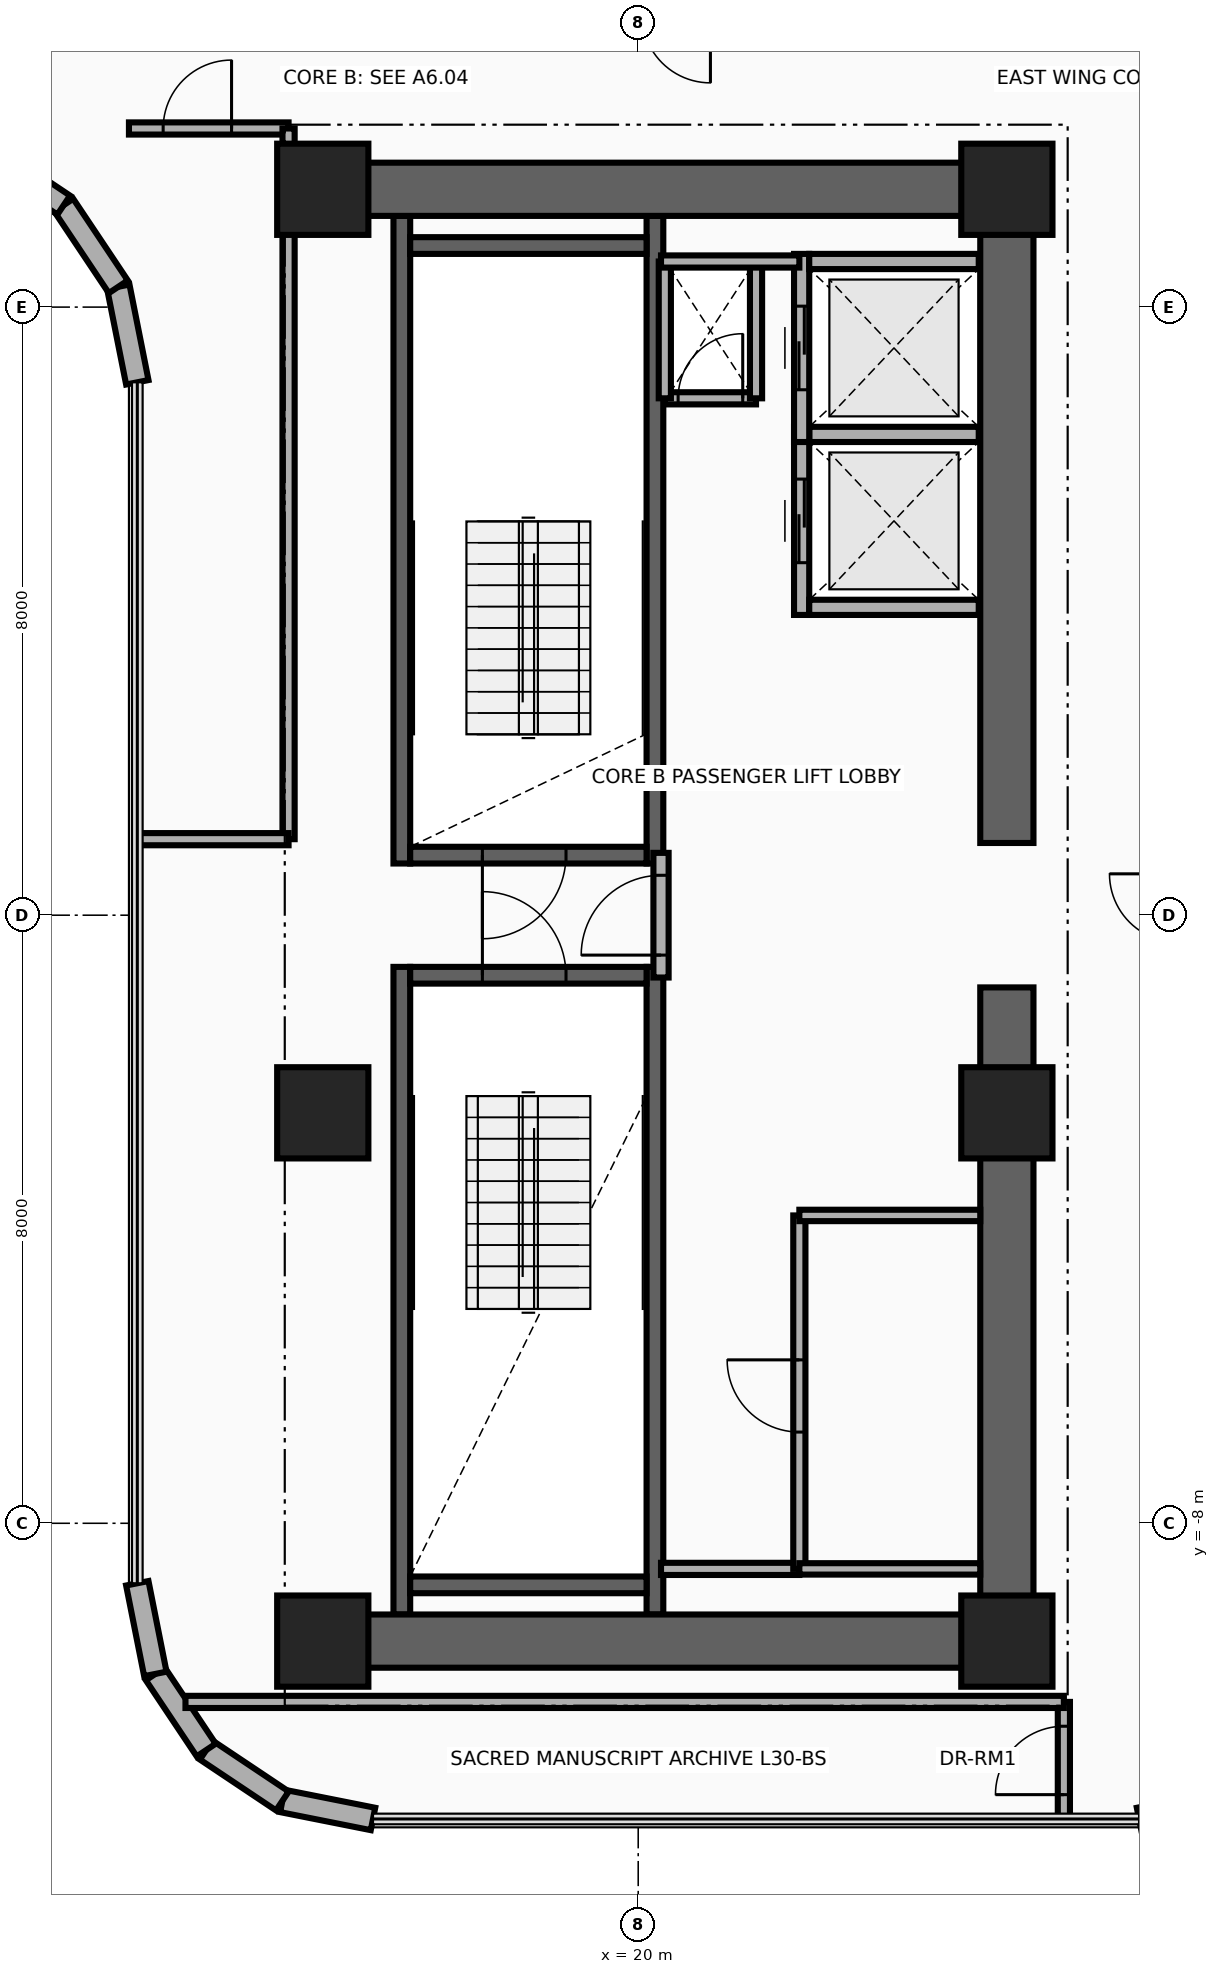
"""IFC4 building model, lengths in metres.
Left out: names, types, materials, properties, quantities, classifications, styles, units other than length and angle.
Written with IfcOpenShell. Run it as: python <this file> out.ifc"""

import sys

from ifc_helpers import new_model, si_unit, direction, frame, frame_2d, origin, origin_2d, place, context, subcontext, project, spatial, rectangle, extrude, source, transform, mapped, element, fill, save


model = new_model("IFC4")
c1 = context("Model", 3, precision=1e-05, world=origin(), true_north=direction((0.0, 1.0)))
c2 = subcontext(c1, "Body", "Model", "MODEL_VIEW")
j1 = project(units=[si_unit("LENGTHUNIT", "METRE"), si_unit("PLANEANGLEUNIT", "RADIAN")], contexts=[c1])
p1 = place(None, origin())
s1 = spatial("IfcSite", under=j1, at=p1, CompositionType="ELEMENT")
p2 = place(p1, origin())
s2 = spatial("IfcBuilding", under=s1, at=p2, CompositionType="ELEMENT")
p3 = place(p2, frame((0.0, 0.0, 120.5)))
s3 = spatial("IfcBuildingStorey", under=s2, at=p3, CompositionType="ELEMENT", Elevation=120.5)
for number, where, z_axis, x_axis in (
    (1, (16.89, 0.68, 0.0), (0.0, 0.0, 1.0), (0.0, 1.0, 0.0)),
    (2, (20.22, 0.68, 0.0), (0.0, 0.0, 1.0), (0.0, 1.0, 0.0)),
):
    element("IfcWall", number, at=place(p3, frame(where, z_axis=z_axis, x_axis=x_axis)), inside=s3, PredefinedType="SHEAR", context=c2, shape_type="SweptSolid", body=[
        extrude(rectangle(XDim=8.52, YDim=0.22, at=frame_2d((4.26, 0.0))), origin(), (0.0, 0.0, 1.0), 3.46),
    ])
p4 = place(p3, frame((17.0, 0.79, 0.0), z_axis=(0.0, 0.0, 1.0), x_axis=(1.0, 0.0, 0.0)))
e3 = element("IfcWall", 3, at=p4, inside=s3, PredefinedType="SHEAR", context=c2, shape_type="SweptSolid", body=[
    extrude(rectangle(XDim=3.11, YDim=0.22, at=frame_2d((1.555, 0.0))), origin(), (0.0, 0.0, 1.0), 3.46),
])
p5 = place(p4, frame((0.95, 0.0, 0.0)))
e4 = element("IfcOpeningElement", 4, at=p5, cuts=e3, PredefinedType="OPENING", context=c2, shape_type="SweptSolid", body=[
    extrude(rectangle(XDim=1.1, YDim=2.15, at=frame_2d((0.55, 1.075))), frame((0.0, 0.125, 0.0), z_axis=(0.0, -1.0, 0.0), x_axis=(1.0, 0.0, 0.0)), (0.0, 0.0, 1.0), 0.25),
])
p6 = place(p3, frame((17.0, 8.81, 0.0), z_axis=(0.0, 0.0, 1.0), x_axis=(1.0, 0.0, 0.0)))
e5 = element("IfcWall", 5, at=p6, inside=s3, PredefinedType="SHEAR", context=c2, shape_type="SweptSolid", body=[
    extrude(rectangle(XDim=3.11, YDim=0.22, at=frame_2d((1.555, 0.0))), origin(), (0.0, 0.0, 1.0), 3.46),
])
for number, where, z_axis, x_axis in (
    (6, (16.89, -9.2, 0.0), (0.0, 0.0, 1.0), (0.0, 1.0, 0.0)),
    (7, (20.22, -9.2, 0.0), (0.0, 0.0, 1.0), (0.0, 1.0, 0.0)),
):
    element("IfcWall", number, at=place(p3, frame(where, z_axis=z_axis, x_axis=x_axis)), inside=s3, PredefinedType="SHEAR", context=c2, shape_type="SweptSolid", body=[
        extrude(rectangle(XDim=8.52, YDim=0.22, at=frame_2d((4.26, 0.0))), origin(), (0.0, 0.0, 1.0), 3.46),
    ])
p7 = place(p3, frame((17.0, -8.81, 0.0), z_axis=(0.0, 0.0, 1.0), x_axis=(1.0, 0.0, 0.0)))
e8 = element("IfcWall", 8, at=p7, inside=s3, PredefinedType="SHEAR", context=c2, shape_type="SweptSolid", body=[
    extrude(rectangle(XDim=3.11, YDim=0.22, at=frame_2d((1.555, 0.0))), origin(), (0.0, 0.0, 1.0), 3.46),
])
p8 = place(p3, frame((17.0, -0.79, 0.0), z_axis=(0.0, 0.0, 1.0), x_axis=(1.0, 0.0, 0.0)))
e9 = element("IfcWall", 9, at=p8, inside=s3, PredefinedType="SHEAR", context=c2, shape_type="SweptSolid", body=[
    extrude(rectangle(XDim=3.11, YDim=0.22, at=frame_2d((1.555, 0.0))), origin(), (0.0, 0.0, 1.0), 3.46),
])
p9 = place(p8, frame((0.95, 0.0, 0.0)))
e10 = element("IfcOpeningElement", 10, at=p9, cuts=e9, PredefinedType="OPENING", context=c2, shape_type="SweptSolid", body=[
    extrude(rectangle(XDim=1.1, YDim=2.15, at=frame_2d((0.55, 1.075))), frame((0.0, 0.125, 0.0), z_axis=(0.0, -1.0, 0.0), x_axis=(1.0, 0.0, 0.0)), (0.0, 0.0, 1.0), 0.25),
])
for number, where, z_axis, x_axis in (
    (11, (24.85, -9.9, 0.0), (0.0, 0.0, 1.0), (0.0, 1.0, 0.0)),
    (12, (24.85, 0.95, 0.0), (0.0, 0.0, 1.0), (0.0, 1.0, 0.0)),
):
    element("IfcWall", number, at=place(p3, frame(where, z_axis=z_axis, x_axis=x_axis)), inside=s3, PredefinedType="SHEAR", context=c2, shape_type="SweptSolid", body=[
        extrude(rectangle(XDim=8.95, YDim=0.7, at=frame_2d((4.475, 0.0))), origin(), (0.0, 0.0, 1.0), 3.46),
    ])
for number, where, z_axis, x_axis in (
    (13, (15.85, 9.55, 0.0), (0.0, 0.0, 1.0), (1.0, 0.0, 0.0)),
    (14, (15.85, -9.55, 0.0), (0.0, 0.0, 1.0), (1.0, 0.0, 0.0)),
):
    element("IfcWall", number, at=place(p3, frame(where, z_axis=z_axis, x_axis=x_axis)), inside=s3, PredefinedType="SHEAR", context=c2, shape_type="SweptSolid", body=[
        extrude(rectangle(XDim=9.0, YDim=0.7, at=frame_2d((4.5, 0.0))), origin(), (0.0, 0.0, 1.0), 3.46),
    ])
m1 = source(origin(), c2, "Body", "SweptSolid", [
    extrude(rectangle(XDim=1.2, YDim=1.2, at=origin_2d()), origin(), (0.0, 0.0, 1.0), 3.7),
])
for number, where, z_axis, x_axis in (
    (15, (15.85, -9.55, 0.0), (0.0, 0.0, 1.0), (1.0, 0.0, 0.0)),
    (16, (24.85, -9.55, 0.0), (0.0, 0.0, 1.0), (1.0, 0.0, 0.0)),
    (17, (15.85, -2.6, 0.0), (0.0, 0.0, 1.0), (1.0, 0.0, 0.0)),
    (18, (24.85, -2.6, 0.0), (0.0, 0.0, 1.0), (1.0, 0.0, 0.0)),
    (19, (15.85, 9.55, 0.0), (0.0, 0.0, 1.0), (1.0, 0.0, 0.0)),
    (20, (24.85, 9.55, 0.0), (0.0, 0.0, 1.0), (1.0, 0.0, 0.0)),
):
    element("IfcColumn", number, at=place(p3, frame(where, z_axis=z_axis, x_axis=x_axis)), inside=s3, PredefinedType="COLUMN", context=c2, shape_type="MappedRepresentation", body=[
        mapped(m1, transform((0.0, 0.0, 0.0), x_axis=(1.0, 0.0, 0.0), y_axis=(0.0, 1.0, 0.0), z_axis=(0.0, 0.0, 1.0), scale=1.0)),
    ])
p10 = place(p3, frame((27.782, -11.653, 0.0), z_axis=(0.0, 0.0, 1.0), x_axis=(-0.980811661072, -0.194957650543, 0.0)))
e21 = element("IfcWall", 21, at=p10, inside=s3, PredefinedType="SOLIDWALL", context=c2, shape_type="SweptSolid", body=[
    extrude(rectangle(XDim=1.216, YDim=0.3, at=frame_2d((0.608, 0.0))), origin(), (0.0, 0.0, 1.0), 3.46),
])
p11 = place(p3, frame((16.511, -11.89, 0.0), z_axis=(0.0, 0.0, 1.0), x_axis=(-0.980804027463, 0.194996050505, 0.0)))
e22 = element("IfcWall", 22, at=p11, inside=s3, PredefinedType="SOLIDWALL", context=c2, shape_type="SweptSolid", body=[
    extrude(rectangle(XDim=1.216, YDim=0.3, at=frame_2d((0.608, 0.0))), origin(), (0.0, 0.0, 1.0), 3.46),
])
for number, where, z_axis, x_axis in (
    (23, (15.318, -11.653, 0.0), (0.0, 0.0, 1.0), (-0.831, 0.556, 0.0)),
    (24, (14.317, -10.983, 0.0), (0.0, 0.0, 1.0), (-0.556, 0.831, 0.0)),
):
    element("IfcWall", number, at=place(p3, frame(where, z_axis=z_axis, x_axis=x_axis)), inside=s3, PredefinedType="SOLIDWALL", context=c2, shape_type="SweptSolid", body=[
        extrude(rectangle(XDim=1.205, YDim=0.3, at=frame_2d((0.603, 0.0))), origin(), (0.0, 0.0, 1.0), 3.46),
    ])
p12 = place(p3, frame((13.647, -9.982, 0.0), z_axis=(0.0, 0.0, 1.0), x_axis=(-0.195189223115, 0.980765602568, 0.0)))
e25 = element("IfcWall", 25, at=p12, inside=s3, PredefinedType="SOLIDWALL", context=c2, shape_type="SweptSolid", body=[
    extrude(rectangle(XDim=1.216, YDim=0.3, at=frame_2d((0.608, 0.0))), origin(), (0.0, 0.0, 1.0), 3.46),
])
p13 = place(p3, frame((13.41, 7.011, 0.0), z_axis=(0.0, 0.0, 1.0), x_axis=(-0.195090163074, 0.980785312019, 0.0)))
e26 = element("IfcWall", 26, at=p13, inside=s3, PredefinedType="SOLIDWALL", context=c2, shape_type="SweptSolid", body=[
    extrude(rectangle(XDim=1.281, YDim=0.3, at=frame_2d((0.641, 0.0))), origin(), (0.0, 0.0, 1.0), 3.46),
])
for number, where, z_axis, x_axis in (
    (27, (13.16, 8.268, 0.0), (0.0, 0.0, 1.0), (-0.556, 0.831, 0.0)),
    (28, (12.442, 9.342, 0.0), (0.0, 0.0, 1.0), (-0.831, 0.556, 0.0)),
):
    element("IfcWall", number, at=place(p3, frame(where, z_axis=z_axis, x_axis=x_axis)), inside=s3, PredefinedType="SOLIDWALL", context=c2, shape_type="SweptSolid", body=[
        extrude(rectangle(XDim=1.292, YDim=0.3, at=frame_2d((0.646, 0.0))), origin(), (0.0, 0.0, 1.0), 3.46),
    ])
p14 = place(p3, frame((22.15, 3.95, 0.0), z_axis=(0.0, 0.0, 1.0), x_axis=(0.0, 1.0, 0.0)))
e29 = element("IfcWall", 29, at=p14, inside=s3, PredefinedType="MOVABLE", context=c2, shape_type="SweptSolid", body=[
    extrude(rectangle(XDim=2.475, YDim=0.2, at=frame_2d((1.238, 0.0))), origin(), (0.0, 0.0, 1.0), 3.46),
])
p15 = place(p14, frame((0.688, 0.0, 0.0)))
e30 = element("IfcOpeningElement", 30, at=p15, cuts=e29, PredefinedType="OPENING", context=c2, shape_type="SweptSolid", body=[
    extrude(rectangle(XDim=1.1, YDim=2.1, at=frame_2d((0.55, 1.05))), frame((0.0, 0.115, 0.0), z_axis=(0.0, -1.0, 0.0), x_axis=(1.0, 0.0, 0.0)), (0.0, 0.0, 1.0), 0.23),
])
for number, where, z_axis, x_axis in (
    (31, (22.25, 4.05, 0.0), (0.0, 0.0, 1.0), (1.0, 0.0, 0.0)),
    (32, (22.25, 6.325, 0.0), (0.0, 0.0, 1.0), (1.0, 0.0, 0.0)),
):
    element("IfcWall", number, at=place(p3, frame(where, z_axis=z_axis, x_axis=x_axis)), inside=s3, PredefinedType="MOVABLE", context=c2, shape_type="SweptSolid", body=[
        extrude(rectangle(XDim=2.23, YDim=0.2, at=frame_2d((1.115, 0.0))), origin(), (0.0, 0.0, 1.0), 2.245),
    ])
p16 = place(p3, frame((22.15, 6.225, 0.0), z_axis=(0.0, 0.0, 1.0), x_axis=(0.0, 1.0, 0.0)))
e33 = element("IfcWall", 33, at=p16, inside=s3, PredefinedType="MOVABLE", context=c2, shape_type="SweptSolid", body=[
    extrude(rectangle(XDim=2.475, YDim=0.2, at=frame_2d((1.237, 0.0))), origin(), (0.0, 0.0, 1.0), 3.46),
])
p17 = place(p16, frame((0.688, 0.0, 0.0)))
e34 = element("IfcOpeningElement", 34, at=p17, cuts=e33, PredefinedType="OPENING", context=c2, shape_type="SweptSolid", body=[
    extrude(rectangle(XDim=1.1, YDim=2.1, at=frame_2d((0.55, 1.05))), frame((0.0, 0.115, 0.0), z_axis=(0.0, -1.0, 0.0), x_axis=(1.0, 0.0, 0.0)), (0.0, 0.0, 1.0), 0.23),
])
p18 = place(p3, frame((22.25, 8.6, 0.0), z_axis=(0.0, 0.0, 1.0), x_axis=(1.0, 0.0, 0.0)))
e35 = element("IfcWall", 35, at=p18, inside=s3, PredefinedType="MOVABLE", context=c2, shape_type="SweptSolid", body=[
    extrude(rectangle(XDim=2.23, YDim=0.2, at=frame_2d((1.115, 0.0))), origin(), (0.0, 0.0, 1.0), 2.245),
])
p19 = place(p3, frame((20.3, -0.82, 0.0), z_axis=(0.0, 0.0, 1.0), x_axis=(0.0, 1.0, 0.0)))
e36 = element("IfcWall", 36, at=p19, inside=s3, PredefinedType="PARTITIONING", context=c2, shape_type="SweptSolid", body=[
    extrude(rectangle(XDim=1.64, YDim=0.2, at=frame_2d((0.82, 0.0))), origin(), (0.0, 0.0, 1.0), 3.46),
])
p20 = place(p19, frame((0.295, 0.0, 0.0)))
e37 = element("IfcOpeningElement", 37, at=p20, cuts=e36, PredefinedType="OPENING", context=c2, shape_type="SweptSolid", body=[
    extrude(rectangle(XDim=1.05, YDim=2.15, at=frame_2d((0.525, 1.075))), frame((0.0, 0.115, 0.0), z_axis=(0.0, -1.0, 0.0), x_axis=(1.0, 0.0, 0.0)), (0.0, 0.0, 1.0), 0.23),
])
p21 = place(p3, frame((20.35, 6.8, 0.0), z_axis=(0.0, 0.0, 1.0), x_axis=(1.0, 0.0, 0.0)))
e38 = element("IfcWall", 38, at=p21, inside=s3, PredefinedType="PARTITIONING", context=c2, shape_type="SweptSolid", body=[
    extrude(rectangle(XDim=1.2, YDim=0.16, at=frame_2d((0.6, 0.0))), origin(), (0.0, 0.0, 1.0), 3.46),
])
p22 = place(p21, frame((0.175, 0.0, 0.0)))
e39 = element("IfcOpeningElement", 39, at=p22, cuts=e38, PredefinedType="OPENING", context=c2, shape_type="SweptSolid", body=[
    extrude(rectangle(XDim=0.85, YDim=2.05, at=frame_2d((0.425, 1.025))), frame((0.0, 0.095, 0.0), z_axis=(0.0, -1.0, 0.0), x_axis=(1.0, 0.0, 0.0)), (0.0, 0.0, 1.0), 0.19),
])
for number, where, z_axis, x_axis in (
    (40, (21.55, 6.8, 0.0), (0.0, 0.0, 1.0), (0.0, 1.0, 0.0)),
    (41, (20.35, 6.8, 0.0), (0.0, 0.0, 1.0), (0.0, 1.0, 0.0)),
):
    element("IfcWall", number, at=place(p3, frame(where, z_axis=z_axis, x_axis=x_axis)), inside=s3, PredefinedType="PARTITIONING", context=c2, shape_type="SweptSolid", body=[
        extrude(rectangle(XDim=1.8, YDim=0.16, at=frame_2d((0.9, 0.0))), origin(), (0.0, 0.0, 1.0), 3.46),
    ])
for number, where, z_axis, x_axis in (
    (42, (20.3, -8.6, 0.0), (0.0, 0.0, 1.0), (1.0, 0.0, 0.0)),
    (43, (20.3, 8.6, 0.0), (0.0, 0.0, 1.0), (1.0, 0.0, 0.0)),
):
    element("IfcWall", number, at=place(p3, frame(where, z_axis=z_axis, x_axis=x_axis)), inside=s3, PredefinedType="PARTITIONING", context=c2, shape_type="SweptSolid", body=[
        extrude(rectangle(XDim=1.82, YDim=0.16, at=frame_2d((0.91, 0.0))), origin(), (0.0, 0.0, 1.0), 3.46),
    ])
p23 = place(p3, frame((22.12, -8.6, 0.0), z_axis=(0.0, 0.0, 1.0), x_axis=(0.0, 1.0, 0.0)))
e44 = element("IfcWall", 44, at=p23, inside=s3, PredefinedType="PARTITIONING", context=c2, shape_type="SweptSolid", body=[
    extrude(rectangle(XDim=4.65, YDim=0.16, at=frame_2d((2.325, 0.0))), origin(), (0.0, 0.0, 1.0), 3.46),
])
p24 = place(p23, frame((1.8, 0.0, 0.0)))
e45 = element("IfcOpeningElement", 45, at=p24, cuts=e44, PredefinedType="OPENING", context=c2, shape_type="SweptSolid", body=[
    extrude(rectangle(XDim=0.95, YDim=2.15, at=frame_2d((0.475, 1.075))), frame((0.0, 0.095, 0.0), z_axis=(0.0, -1.0, 0.0), x_axis=(1.0, 0.0, 0.0)), (0.0, 0.0, 1.0), 0.19),
])
for number, where, z_axis, x_axis in (
    (46, (22.12, -3.95, 0.0), (0.0, 0.0, 1.0), (1.0, 0.0, 0.0)),
    (47, (22.12, -8.6, 0.0), (0.0, 0.0, 1.0), (1.0, 0.0, 0.0)),
):
    element("IfcWall", number, at=place(p3, frame(where, z_axis=z_axis, x_axis=x_axis)), inside=s3, PredefinedType="PARTITIONING", context=c2, shape_type="SweptSolid", body=[
        extrude(rectangle(XDim=2.38, YDim=0.15, at=frame_2d((1.19, 0.0))), origin(), (0.0, 0.0, 1.0), 3.46),
    ])
p25 = place(p3, frame((25.6, -11.89, 0.0), z_axis=(0.0, 0.0, 1.0), x_axis=(0.0, 1.0, 0.0)))
e48 = element("IfcWall", 48, at=p25, inside=s3, PredefinedType="PARTITIONING", context=c2, shape_type="SweptSolid", body=[
    extrude(rectangle(XDim=1.54, YDim=0.16, at=frame_2d((0.77, 0.0))), origin(), (0.0, 0.0, 1.0), 3.46),
])
p26 = place(p25, frame((0.32, 0.0, 0.0)))
e49 = element("IfcOpeningElement", 49, at=p26, cuts=e48, PredefinedType="OPENING", context=c2, shape_type="SweptSolid", body=[
    extrude(rectangle(XDim=0.9, YDim=2.1, at=frame_2d((0.45, 1.05))), frame((0.0, 0.095, 0.0), z_axis=(0.0, -1.0, 0.0), x_axis=(1.0, 0.0, 0.0)), (0.0, 0.0, 1.0), 0.19),
])
p27 = place(p3, frame((14.044, -10.35, 0.0), z_axis=(0.0, 0.0, 1.0), x_axis=(1.0, 0.0, 0.0)))
e50 = element("IfcWall", 50, at=p27, inside=s3, PredefinedType="PARTITIONING", context=c2, shape_type="SweptSolid", body=[
    extrude(rectangle(XDim=11.556, YDim=0.16, at=frame_2d((5.778, 0.0))), origin(), (0.0, 0.0, 1.0), 3.46),
])
p28 = place(p3, frame((13.3, 10.35, 0.0), z_axis=(0.0, 0.0, 1.0), x_axis=(1.0, 0.0, 0.0)))
e51 = element("IfcWall", 51, at=p28, inside=s3, PredefinedType="PARTITIONING", context=c2, shape_type="SweptSolid", body=[
    extrude(rectangle(XDim=2.1, YDim=0.16, at=frame_2d((1.05, 0.0))), origin(), (0.0, 0.0, 1.0), 2.666),
])
p29 = place(p28, frame((0.45, 0.0, 0.0)))
e52 = element("IfcOpeningElement", 52, at=p29, cuts=e51, PredefinedType="OPENING", context=c2, shape_type="SweptSolid", body=[
    extrude(rectangle(XDim=0.9, YDim=2.1, at=frame_2d((0.45, 1.05))), frame((0.0, 0.095, 0.0), z_axis=(0.0, -1.0, 0.0), x_axis=(1.0, 0.0, 0.0)), (0.0, 0.0, 1.0), 0.19),
])
p30 = place(p3, frame((15.4, 1.0, 0.0), z_axis=(0.0, 0.0, 1.0), x_axis=(0.0, 1.0, 0.0)))
e53 = element("IfcWall", 53, at=p30, inside=s3, PredefinedType="PARTITIONING", context=c2, shape_type="SweptSolid", body=[
    extrude(rectangle(XDim=9.35, YDim=0.16, at=frame_2d((4.675, 0.0))), origin(), (0.0, 0.0, 1.0), 2.245),
])
p31 = place(p3, frame((13.41, 1.0, 0.0), z_axis=(0.0, 0.0, 1.0), x_axis=(1.0, 0.0, 0.0)))
e54 = element("IfcWall", 54, at=p31, inside=s3, PredefinedType="PARTITIONING", context=c2, shape_type="SweptSolid", body=[
    extrude(rectangle(XDim=1.99, YDim=0.16, at=frame_2d((0.995, 0.0))), origin(), (0.0, 0.0, 1.0), 2.245),
])
p32 = place(p15, origin())
e55 = element("IfcDoor", 55, at=p32, inside=s3, OperationType="DOUBLE_DOOR_SLIDING", PredefinedType="DOOR", context=c2, shape_type="SweptSolid", body=[
    extrude(rectangle(XDim=1.1, YDim=2.1, at=frame_2d((0.55, 1.05))), frame((0.0, 0.025, 0.0), z_axis=(0.0, -1.0, 0.0), x_axis=(1.0, 0.0, 0.0)), (0.0, 0.0, 1.0), 0.05),
])
fill(e30, e55)
p33 = place(p17, origin())
e56 = element("IfcDoor", 56, at=p33, inside=s3, OperationType="DOUBLE_DOOR_SLIDING", PredefinedType="DOOR", context=c2, shape_type="SweptSolid", body=[
    extrude(rectangle(XDim=1.1, YDim=2.1, at=frame_2d((0.55, 1.05))), frame((0.0, 0.025, 0.0), z_axis=(0.0, -1.0, 0.0), x_axis=(1.0, 0.0, 0.0)), (0.0, 0.0, 1.0), 0.05),
])
fill(e34, e56)
p34 = place(p20, origin())
e57 = element("IfcDoor", 57, at=p34, inside=s3, OperationType="SINGLE_SWING_RIGHT", PredefinedType="DOOR", context=c2, shape_type="SweptSolid", body=[
    extrude(rectangle(XDim=1.05, YDim=2.15, at=frame_2d((0.525, 1.075))), frame((0.0, 0.025, 0.0), z_axis=(0.0, -1.0, 0.0), x_axis=(1.0, 0.0, 0.0)), (0.0, 0.0, 1.0), 0.05),
])
fill(e37, e57)
p35 = place(p5, frame((1.1, 0.0, 0.0), z_axis=(0.0, 0.0, 1.0), x_axis=(-1.0, 0.0, 0.0)))
e58 = element("IfcDoor", 58, at=p35, inside=s3, OperationType="SINGLE_SWING_LEFT", PredefinedType="DOOR", context=c2, shape_type="SweptSolid", body=[
    extrude(rectangle(XDim=1.1, YDim=2.15, at=frame_2d((0.55, 1.075))), frame((0.0, 0.025, 0.0), z_axis=(0.0, -1.0, 0.0), x_axis=(1.0, 0.0, 0.0)), (0.0, 0.0, 1.0), 0.05),
])
fill(e4, e58)
p36 = place(p9, origin())
e59 = element("IfcDoor", 59, at=p36, inside=s3, OperationType="SINGLE_SWING_RIGHT", PredefinedType="DOOR", context=c2, shape_type="SweptSolid", body=[
    extrude(rectangle(XDim=1.1, YDim=2.15, at=frame_2d((0.55, 1.075))), frame((0.0, 0.025, 0.0), z_axis=(0.0, -1.0, 0.0), x_axis=(1.0, 0.0, 0.0)), (0.0, 0.0, 1.0), 0.05),
])
fill(e10, e59)
p37 = place(p22, origin())
e60 = element("IfcDoor", 60, at=p37, inside=s3, OperationType="SINGLE_SWING_LEFT", PredefinedType="DOOR", context=c2, shape_type="SweptSolid", body=[
    extrude(rectangle(XDim=0.85, YDim=2.05, at=frame_2d((0.425, 1.025))), frame((0.0, 0.025, 0.0), z_axis=(0.0, -1.0, 0.0), x_axis=(1.0, 0.0, 0.0)), (0.0, 0.0, 1.0), 0.05),
])
fill(e39, e60)
p38 = place(p24, origin())
e61 = element("IfcDoor", 61, at=p38, inside=s3, OperationType="SINGLE_SWING_RIGHT", PredefinedType="DOOR", context=c2, shape_type="SweptSolid", body=[
    extrude(rectangle(XDim=0.95, YDim=2.15, at=frame_2d((0.475, 1.075))), frame((0.0, 0.025, 0.0), z_axis=(0.0, -1.0, 0.0), x_axis=(1.0, 0.0, 0.0)), (0.0, 0.0, 1.0), 0.05),
])
fill(e45, e61)
p39 = place(p26, origin())
e62 = element("IfcDoor", 62, at=p39, inside=s3, OperationType="SINGLE_SWING_RIGHT", PredefinedType="DOOR", context=c2, shape_type="SweptSolid", body=[
    extrude(rectangle(XDim=0.9, YDim=2.1, at=frame_2d((0.45, 1.05))), frame((0.0, 0.025, 0.0), z_axis=(0.0, -1.0, 0.0), x_axis=(1.0, 0.0, 0.0)), (0.0, 0.0, 1.0), 0.05),
])
fill(e49, e62)
p40 = place(p29, origin())
e63 = element("IfcDoor", 63, at=p40, inside=s3, OperationType="SINGLE_SWING_LEFT", PredefinedType="DOOR", context=c2, shape_type="SweptSolid", body=[
    extrude(rectangle(XDim=0.9, YDim=2.1, at=frame_2d((0.45, 1.05))), frame((0.0, 0.025, 0.0), z_axis=(0.0, -1.0, 0.0), x_axis=(1.0, 0.0, 0.0)), (0.0, 0.0, 1.0), 0.05),
])
fill(e52, e63)
save(model, sys.argv[1])
